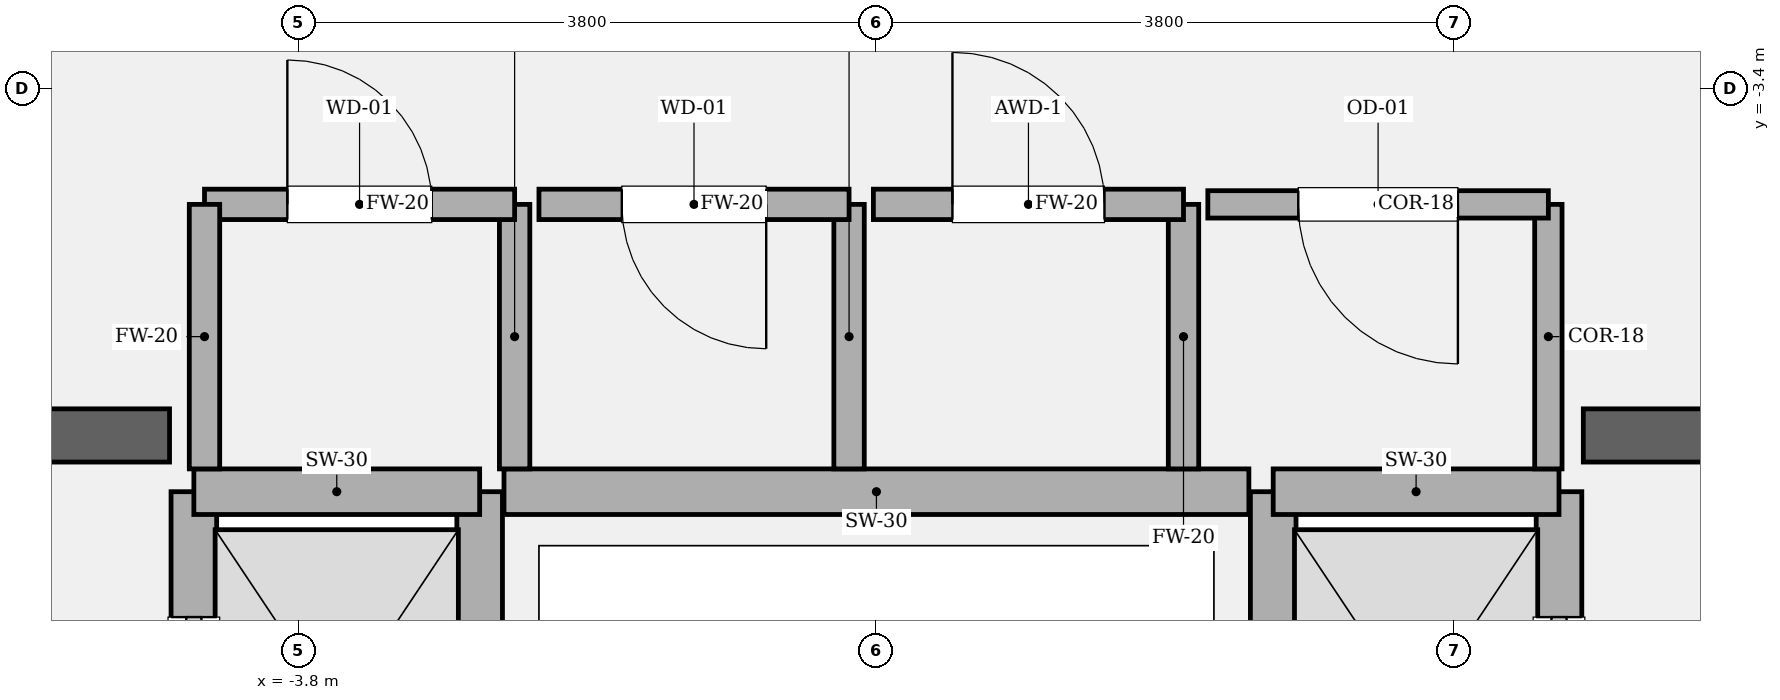
"""IFC4 building model, lengths in metres.
Left out: names, types, materials, properties, quantities, classifications, styles, units other than length and angle.
Written with IfcOpenShell. Run it as: python <this file> out.ifc"""

import sys

from ifc_helpers import new_model, si_unit, direction, frame, frame_2d, origin, place, context, subcontext, project, spatial, rectangle, extrude, element, fill, save


model = new_model("IFC4")
c1 = context("Model", 3, precision=1e-05, world=origin(), true_north=direction((0.0, 1.0)))
c2 = subcontext(c1, "Body", "Model", "MODEL_VIEW")
j1 = project(units=[si_unit("LENGTHUNIT", "METRE"), si_unit("PLANEANGLEUNIT", "RADIAN")], contexts=[c1])
p1 = place(None, origin())
s1 = spatial("IfcSite", under=j1, at=p1, CompositionType="ELEMENT")
p2 = place(p1, origin())
s2 = spatial("IfcBuilding", under=s1, at=p2, CompositionType="ELEMENT")
p3 = place(p2, frame((0.0, 0.0, 88.95)))
s3 = spatial("IfcBuildingStorey", under=s2, at=p3, CompositionType="ELEMENT", Elevation=88.95)
p4 = place(p3, frame((-9.825, -5.68, 0.0), z_axis=(0.0, 0.0, 1.0), x_axis=(1.0, 0.0, 0.0)))
e1 = element("IfcWall", 1, at=p4, inside=s3, PredefinedType="SOLIDWALL", context=c2, shape_type="SweptSolid", body=[
    extrude(rectangle(XDim=5.175, YDim=0.35, at=frame_2d((2.587, 0.0))), origin(), (0.0, 0.0, 1.0), 4.05),
])
p5 = place(p4, frame((1.285, 0.0, 0.0)))
e2 = element("IfcOpeningElement", 2, at=p5, cuts=e1, PredefinedType="OPENING", context=c2, shape_type="SweptSolid", body=[
    extrude(rectangle(XDim=1.18, YDim=2.2, at=frame_2d((0.59, 1.1))), frame((0.0, 0.185, 0.0), z_axis=(0.0, -1.0, 0.0), x_axis=(1.0, 0.0, 0.0)), (0.0, 0.0, 1.0), 0.37),
])
p6 = place(p3, frame((4.65, -5.68, 0.0), z_axis=(0.0, 0.0, 1.0), x_axis=(1.0, 0.0, 0.0)))
e3 = element("IfcWall", 3, at=p6, inside=s3, PredefinedType="SOLIDWALL", context=c2, shape_type="SweptSolid", body=[
    extrude(rectangle(XDim=5.175, YDim=0.35, at=frame_2d((2.587, 0.0))), origin(), (0.0, 0.0, 1.0), 4.05),
])
p7 = place(p6, frame((2.71, 0.0, 0.0)))
e4 = element("IfcOpeningElement", 4, at=p7, cuts=e3, PredefinedType="OPENING", context=c2, shape_type="SweptSolid", body=[
    extrude(rectangle(XDim=1.18, YDim=2.2, at=frame_2d((0.59, 1.1))), frame((0.0, 0.185, 0.0), z_axis=(0.0, -1.0, 0.0), x_axis=(1.0, 0.0, 0.0)), (0.0, 0.0, 1.0), 0.37),
])
p8 = place(p3, frame((-4.49, -8.82, 0.0), z_axis=(0.0, 0.0, 1.0), x_axis=(0.0, 1.0, 0.0)))
e5 = element("IfcWall", 5, at=p8, inside=s3, PredefinedType="SOLIDWALL", context=c2, shape_type="SweptSolid", body=[
    extrude(rectangle(XDim=2.77, YDim=0.3, at=frame_2d((1.385, 0.0))), origin(), (0.0, 0.0, 1.0), 3.77),
])
p9 = place(p8, frame((0.825, 0.0, 0.0)))
e6 = element("IfcOpeningElement", 6, at=p9, cuts=e5, PredefinedType="OPENING", context=c2, shape_type="SweptSolid", body=[
    extrude(rectangle(XDim=1.12, YDim=2.25, at=frame_2d((0.56, 1.125))), frame((0.0, 0.16, 0.0), z_axis=(0.0, -1.0, 0.0), x_axis=(1.0, 0.0, 0.0)), (0.0, 0.0, 1.0), 0.32),
])
p10 = place(p3, frame((-2.61, -8.82, 0.0), z_axis=(0.0, 0.0, 1.0), x_axis=(0.0, 1.0, 0.0)))
e7 = element("IfcWall", 7, at=p10, inside=s3, PredefinedType="SOLIDWALL", context=c2, shape_type="SweptSolid", body=[
    extrude(rectangle(XDim=2.77, YDim=0.3, at=frame_2d((1.385, 0.0))), origin(), (0.0, 0.0, 1.0), 3.77),
])
p11 = place(p3, frame((-4.49, -6.05, 0.0), z_axis=(0.0, 0.0, 1.0), x_axis=(1.0, 0.0, 0.0)))
e8 = element("IfcWall", 8, at=p11, inside=s3, PredefinedType="SOLIDWALL", context=c2, shape_type="SweptSolid", body=[
    extrude(rectangle(XDim=1.88, YDim=0.3, at=frame_2d((0.94, 0.0))), origin(), (0.0, 0.0, 1.0), 3.77),
])
p12 = place(p3, frame((4.49, -8.82, 0.0), z_axis=(0.0, 0.0, 1.0), x_axis=(0.0, 1.0, 0.0)))
e9 = element("IfcWall", 9, at=p12, inside=s3, PredefinedType="SOLIDWALL", context=c2, shape_type="SweptSolid", body=[
    extrude(rectangle(XDim=2.77, YDim=0.3, at=frame_2d((1.385, 0.0))), origin(), (0.0, 0.0, 1.0), 3.77),
])
p13 = place(p12, frame((0.825, 0.0, 0.0)))
e10 = element("IfcOpeningElement", 10, at=p13, cuts=e9, PredefinedType="OPENING", context=c2, shape_type="SweptSolid", body=[
    extrude(rectangle(XDim=1.12, YDim=2.25, at=frame_2d((0.56, 1.125))), frame((0.0, 0.16, 0.0), z_axis=(0.0, -1.0, 0.0), x_axis=(1.0, 0.0, 0.0)), (0.0, 0.0, 1.0), 0.32),
])
p14 = place(p3, frame((2.61, -8.82, 0.0), z_axis=(0.0, 0.0, 1.0), x_axis=(0.0, 1.0, 0.0)))
e11 = element("IfcWall", 11, at=p14, inside=s3, PredefinedType="SOLIDWALL", context=c2, shape_type="SweptSolid", body=[
    extrude(rectangle(XDim=2.77, YDim=0.3, at=frame_2d((1.385, 0.0))), origin(), (0.0, 0.0, 1.0), 3.77),
])
p15 = place(p3, frame((2.61, -6.05, 0.0), z_axis=(0.0, 0.0, 1.0), x_axis=(1.0, 0.0, 0.0)))
e12 = element("IfcWall", 12, at=p15, inside=s3, PredefinedType="SOLIDWALL", context=c2, shape_type="SweptSolid", body=[
    extrude(rectangle(XDim=1.88, YDim=0.3, at=frame_2d((0.94, 0.0))), origin(), (0.0, 0.0, 1.0), 3.77),
])
p16 = place(p3, frame((-2.45, -6.05, 0.0), z_axis=(0.0, 0.0, 1.0), x_axis=(1.0, 0.0, 0.0)))
e13 = element("IfcWall", 13, at=p16, inside=s3, PredefinedType="SOLIDWALL", context=c2, shape_type="SweptSolid", body=[
    extrude(rectangle(XDim=4.9, YDim=0.3, at=frame_2d((2.45, 0.0))), origin(), (0.0, 0.0, 1.0), 3.77),
])
p17 = place(p3, frame((-2.38, -5.9, 0.0), z_axis=(0.0, 0.0, 1.0), x_axis=(0.0, 1.0, 0.0)))
e14 = element("IfcWall", 14, at=p17, inside=s3, PredefinedType="SOLIDWALL", context=c2, shape_type="SweptSolid", body=[
    extrude(rectangle(XDim=1.74, YDim=0.2, at=frame_2d((0.87, 0.0))), origin(), (0.0, 0.0, 1.0), 3.77),
])
p18 = place(p3, frame((-2.38, -4.16, 0.0), z_axis=(0.0, 0.0, 1.0), x_axis=(-1.0, 0.0, 0.0)))
e15 = element("IfcWall", 15, at=p18, inside=s3, PredefinedType="SOLIDWALL", context=c2, shape_type="SweptSolid", body=[
    extrude(rectangle(XDim=2.04, YDim=0.2, at=frame_2d((1.02, 0.0))), origin(), (0.0, 0.0, 1.0), 3.77),
])
p19 = place(p18, frame((0.545, 0.0, 0.0)))
e16 = element("IfcOpeningElement", 16, at=p19, cuts=e15, PredefinedType="OPENING", context=c2, shape_type="SweptSolid", body=[
    extrude(rectangle(XDim=0.95, YDim=2.15, at=frame_2d((0.475, 1.075))), frame((0.0, 0.11, 0.0), z_axis=(0.0, -1.0, 0.0), x_axis=(1.0, 0.0, 0.0)), (0.0, 0.0, 1.0), 0.22),
])
for number, where, z_axis, x_axis in (
    (17, (-4.42, -4.16, 0.0), (0.0, 0.0, 1.0), (0.0, -1.0, 0.0)),
    (18, (-0.18, -5.9, 0.0), (0.0, 0.0, 1.0), (0.0, 1.0, 0.0)),
):
    element("IfcWall", number, at=place(p3, frame(where, z_axis=z_axis, x_axis=x_axis)), inside=s3, PredefinedType="SOLIDWALL", context=c2, shape_type="SweptSolid", body=[
        extrude(rectangle(XDim=1.74, YDim=0.2, at=frame_2d((0.87, 0.0))), origin(), (0.0, 0.0, 1.0), 3.77),
    ])
p20 = place(p3, frame((-0.18, -4.16, 0.0), z_axis=(0.0, 0.0, 1.0), x_axis=(-1.0, 0.0, 0.0)))
e19 = element("IfcWall", 19, at=p20, inside=s3, PredefinedType="SOLIDWALL", context=c2, shape_type="SweptSolid", body=[
    extrude(rectangle(XDim=2.04, YDim=0.2, at=frame_2d((1.02, 0.0))), origin(), (0.0, 0.0, 1.0), 3.77),
])
p21 = place(p20, frame((0.545, 0.0, 0.0)))
e20 = element("IfcOpeningElement", 20, at=p21, cuts=e19, PredefinedType="OPENING", context=c2, shape_type="SweptSolid", body=[
    extrude(rectangle(XDim=0.95, YDim=2.15, at=frame_2d((0.475, 1.075))), frame((0.0, 0.11, 0.0), z_axis=(0.0, -1.0, 0.0), x_axis=(1.0, 0.0, 0.0)), (0.0, 0.0, 1.0), 0.22),
])
p22 = place(p3, frame((2.02, -5.9, 0.0), z_axis=(0.0, 0.0, 1.0), x_axis=(0.0, 1.0, 0.0)))
e21 = element("IfcWall", 21, at=p22, inside=s3, PredefinedType="SOLIDWALL", context=c2, shape_type="SweptSolid", body=[
    extrude(rectangle(XDim=1.74, YDim=0.2, at=frame_2d((0.87, 0.0))), origin(), (0.0, 0.0, 1.0), 3.77),
])
p23 = place(p3, frame((2.02, -4.16, 0.0), z_axis=(0.0, 0.0, 1.0), x_axis=(-1.0, 0.0, 0.0)))
e22 = element("IfcWall", 22, at=p23, inside=s3, PredefinedType="SOLIDWALL", context=c2, shape_type="SweptSolid", body=[
    extrude(rectangle(XDim=2.04, YDim=0.2, at=frame_2d((1.02, 0.0))), origin(), (0.0, 0.0, 1.0), 3.77),
])
p24 = place(p23, frame((0.52, 0.0, 0.0)))
e23 = element("IfcOpeningElement", 23, at=p24, cuts=e22, PredefinedType="OPENING", context=c2, shape_type="SweptSolid", body=[
    extrude(rectangle(XDim=1.0, YDim=2.15, at=frame_2d((0.5, 1.075))), frame((0.0, 0.11, 0.0), z_axis=(0.0, -1.0, 0.0), x_axis=(1.0, 0.0, 0.0)), (0.0, 0.0, 1.0), 0.22),
])
p25 = place(p3, frame((4.42, -5.9, 0.0), z_axis=(0.0, 0.0, 1.0), x_axis=(0.0, 1.0, 0.0)))
e24 = element("IfcWall", 24, at=p25, inside=s3, PredefinedType="PARTITIONING", context=c2, shape_type="SweptSolid", body=[
    extrude(rectangle(XDim=1.74, YDim=0.18, at=frame_2d((0.87, 0.0))), origin(), (0.0, 0.0, 1.0), 3.77),
])
p26 = place(p3, frame((4.42, -4.16, 0.0), z_axis=(0.0, 0.0, 1.0), x_axis=(-1.0, 0.0, 0.0)))
e25 = element("IfcWall", 25, at=p26, inside=s3, PredefinedType="PARTITIONING", context=c2, shape_type="SweptSolid", body=[
    extrude(rectangle(XDim=2.24, YDim=0.18, at=frame_2d((1.12, 0.0))), origin(), (0.0, 0.0, 1.0), 3.77),
])
p27 = place(p26, frame((0.595, 0.0, 0.0)))
e26 = element("IfcOpeningElement", 26, at=p27, cuts=e25, PredefinedType="OPENING", context=c2, shape_type="SweptSolid", body=[
    extrude(rectangle(XDim=1.05, YDim=2.2, at=frame_2d((0.525, 1.1))), frame((0.0, 0.1, 0.0), z_axis=(0.0, -1.0, 0.0), x_axis=(1.0, 0.0, 0.0)), (0.0, 0.0, 1.0), 0.2),
])
p28 = place(p9, origin())
e27 = element("IfcDoor", 27, at=p28, inside=s3, OperationType="SLIDING_TO_LEFT", PredefinedType="DOOR", context=c2, shape_type="SweptSolid", body=[
    extrude(rectangle(XDim=1.12, YDim=2.25, at=frame_2d((0.56, 1.125))), frame((0.0, 0.025, 0.0), z_axis=(0.0, -1.0, 0.0), x_axis=(1.0, 0.0, 0.0)), (0.0, 0.0, 1.0), 0.05),
])
fill(e6, e27)
p29 = place(p13, origin())
e28 = element("IfcDoor", 28, at=p29, inside=s3, OperationType="SLIDING_TO_RIGHT", PredefinedType="DOOR", context=c2, shape_type="SweptSolid", body=[
    extrude(rectangle(XDim=1.12, YDim=2.25, at=frame_2d((0.56, 1.125))), frame((0.0, 0.025, 0.0), z_axis=(0.0, -1.0, 0.0), x_axis=(1.0, 0.0, 0.0)), (0.0, 0.0, 1.0), 0.05),
])
fill(e10, e28)
p30 = place(p19, origin())
e29 = element("IfcDoor", 29, at=p30, inside=s3, OperationType="SINGLE_SWING_RIGHT", PredefinedType="DOOR", context=c2, shape_type="SweptSolid", body=[
    extrude(rectangle(XDim=0.95, YDim=2.15, at=frame_2d((0.475, 1.075))), frame((0.0, 0.025, 0.0), z_axis=(0.0, -1.0, 0.0), x_axis=(1.0, 0.0, 0.0)), (0.0, 0.0, 1.0), 0.05),
])
fill(e16, e29)
p31 = place(p21, origin())
e30 = element("IfcDoor", 30, at=p31, inside=s3, OperationType="SINGLE_SWING_LEFT", PredefinedType="DOOR", context=c2, shape_type="SweptSolid", body=[
    extrude(rectangle(XDim=0.95, YDim=2.15, at=frame_2d((0.475, 1.075))), frame((0.0, 0.025, 0.0), z_axis=(0.0, -1.0, 0.0), x_axis=(1.0, 0.0, 0.0)), (0.0, 0.0, 1.0), 0.05),
])
fill(e20, e30)
p32 = place(p24, origin())
e31 = element("IfcDoor", 31, at=p32, inside=s3, OperationType="SINGLE_SWING_RIGHT", PredefinedType="DOOR", context=c2, shape_type="SweptSolid", body=[
    extrude(rectangle(XDim=1.0, YDim=2.15, at=frame_2d((0.5, 1.075))), frame((0.0, 0.025, 0.0), z_axis=(0.0, -1.0, 0.0), x_axis=(1.0, 0.0, 0.0)), (0.0, 0.0, 1.0), 0.05),
])
fill(e23, e31)
p33 = place(p27, origin())
e32 = element("IfcDoor", 32, at=p33, inside=s3, OperationType="SINGLE_SWING_LEFT", PredefinedType="DOOR", context=c2, shape_type="SweptSolid", body=[
    extrude(rectangle(XDim=1.05, YDim=2.2, at=frame_2d((0.525, 1.1))), frame((0.0, 0.025, 0.0), z_axis=(0.0, -1.0, 0.0), x_axis=(1.0, 0.0, 0.0)), (0.0, 0.0, 1.0), 0.05),
])
fill(e26, e32)
save(model, sys.argv[1])
